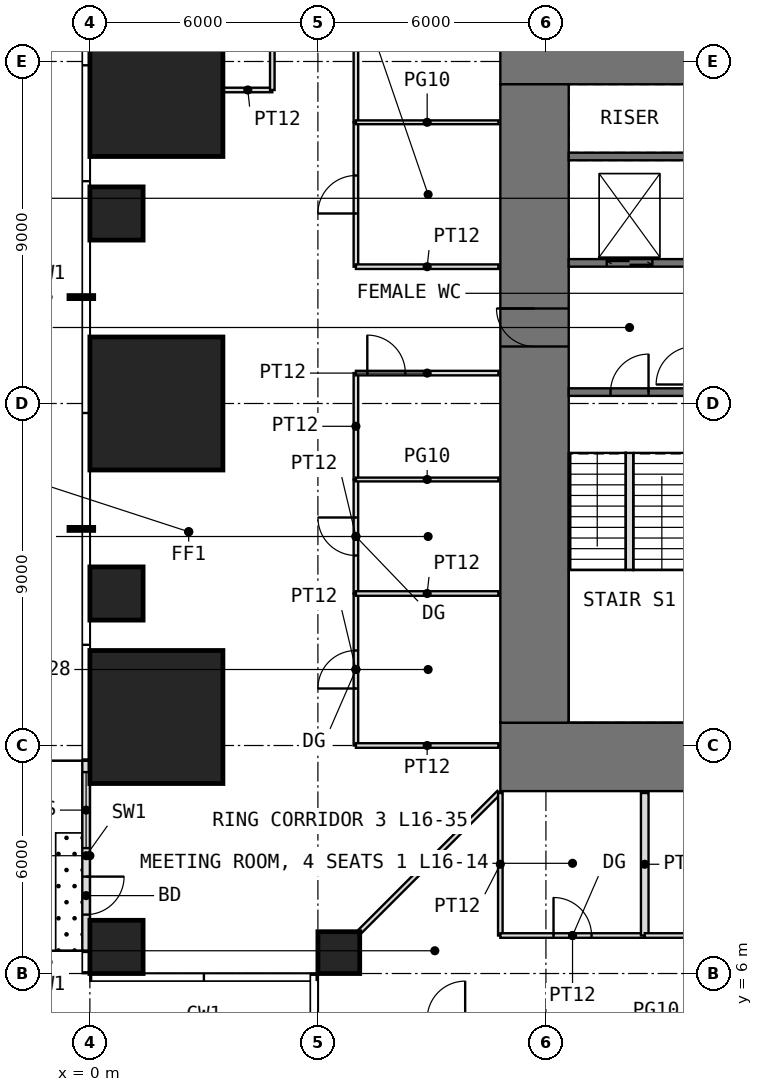
"""IFC4 building model, lengths in metres.
Left out: names, types, materials, properties, quantities, classifications, styles, units other than length and angle.
Written with IfcOpenShell. Run it as: python <this file> out.ifc"""

import sys

from ifc_helpers import new_model, si_unit, direction, frame, frame_2d, origin, origin_2d, place, context, subcontext, project, spatial, rectangle, extrude, element, fill, save


model = new_model("IFC4")
c1 = context("Model", 3, precision=1e-05, world=origin(), true_north=direction((0.0, 1.0)))
c2 = subcontext(c1, "Body", "Model", "MODEL_VIEW")
j1 = project(units=[si_unit("LENGTHUNIT", "METRE"), si_unit("PLANEANGLEUNIT", "RADIAN")], contexts=[c1])
p1 = place(None, origin())
s1 = spatial("IfcSite", under=j1, at=p1, CompositionType="ELEMENT")
p2 = place(p1, origin())
s2 = spatial("IfcBuilding", under=s1, at=p2, CompositionType="ELEMENT")
p3 = place(p2, frame((0.0, 0.0, 70.5)))
s3 = spatial("IfcBuildingStorey", under=s2, at=p3, CompositionType="ELEMENT", Elevation=70.5)
p4 = place(p3, frame((0.7, 6.7, 0.0), z_axis=(0.0, 0.0, 1.0), x_axis=(1.0, 0.0, 0.0)))
e1 = element("IfcColumn", 1, at=p4, inside=s3, PredefinedType="COLUMN", context=c2, shape_type="SweptSolid", body=[
    extrude(rectangle(XDim=1.4, YDim=1.4, at=origin_2d()), origin(), (0.0, 0.0, 1.0), 4.0),
])
p5 = place(p3, frame((6.55, 6.55, 0.0), z_axis=(0.0, 0.0, 1.0), x_axis=(1.0, 0.0, 0.0)))
e2 = element("IfcColumn", 2, at=p5, inside=s3, PredefinedType="COLUMN", context=c2, shape_type="SweptSolid", body=[
    extrude(rectangle(XDim=1.1, YDim=1.1, at=origin_2d()), origin(), (0.0, 0.0, 1.0), 4.0),
])
p6 = place(p3, frame((1.75, 12.75, 0.0), z_axis=(0.0, 0.0, 1.0), x_axis=(1.0, 0.0, 0.0)))
e3 = element("IfcColumn", 3, at=p6, inside=s3, PredefinedType="COLUMN", context=c2, shape_type="SweptSolid", body=[
    extrude(rectangle(XDim=3.5, YDim=3.5, at=origin_2d()), origin(), (0.0, 0.0, 1.0), 4.0),
])
p7 = place(p3, frame((0.7, 16.0, 0.0), z_axis=(0.0, 0.0, 1.0), x_axis=(1.0, 0.0, 0.0)))
e4 = element("IfcColumn", 4, at=p7, inside=s3, PredefinedType="COLUMN", context=c2, shape_type="SweptSolid", body=[
    extrude(rectangle(XDim=1.4, YDim=1.4, at=origin_2d()), origin(), (0.0, 0.0, 1.0), 4.0),
])
p8 = place(p3, frame((1.75, 21.0, 0.0), z_axis=(0.0, 0.0, 1.0), x_axis=(1.0, 0.0, 0.0)))
e5 = element("IfcColumn", 5, at=p8, inside=s3, PredefinedType="COLUMN", context=c2, shape_type="SweptSolid", body=[
    extrude(rectangle(XDim=3.5, YDim=3.5, at=origin_2d()), origin(), (0.0, 0.0, 1.0), 4.0),
])
p9 = place(p3, frame((0.7, 26.0, 0.0), z_axis=(0.0, 0.0, 1.0), x_axis=(1.0, 0.0, 0.0)))
e6 = element("IfcColumn", 6, at=p9, inside=s3, PredefinedType="COLUMN", context=c2, shape_type="SweptSolid", body=[
    extrude(rectangle(XDim=1.4, YDim=1.4, at=origin_2d()), origin(), (0.0, 0.0, 1.0), 4.0),
])
p10 = place(p3, frame((1.75, 29.25, 0.0), z_axis=(0.0, 0.0, 1.0), x_axis=(1.0, 0.0, 0.0)))
e7 = element("IfcColumn", 7, at=p10, inside=s3, PredefinedType="COLUMN", context=c2, shape_type="SweptSolid", body=[
    extrude(rectangle(XDim=3.5, YDim=3.5, at=origin_2d()), origin(), (0.0, 0.0, 1.0), 4.0),
])
p11 = place(p3, frame((-0.1, 11.6, 0.0), z_axis=(0.0, 0.0, 1.0), x_axis=(0.0, -1.0, 0.0)))
e8 = element("IfcWall", 8, at=p11, inside=s3, PredefinedType="USERDEFINED", context=c2, shape_type="SweptSolid", body=[
    extrude(rectangle(XDim=5.0, YDim=0.2, at=frame_2d((2.5, 0.0))), origin(), (0.0, 0.0, 1.0), 3.75),
])
p12 = place(p11, frame((3.05, 0.0, 0.0)))
e9 = element("IfcOpeningElement", 9, at=p12, cuts=e8, PredefinedType="OPENING", context=c2, shape_type="SweptSolid", body=[
    extrude(rectangle(XDim=1.0, YDim=2.4, at=frame_2d((0.5, 1.2))), frame((0.0, 0.11, 0.0), z_axis=(0.0, -1.0, 0.0), x_axis=(1.0, 0.0, 0.0)), (0.0, 0.0, 1.0), 0.22),
])
p13 = place(p11, frame((0.3, 0.0, 0.3)))
e10 = element("IfcOpeningElement", 10, at=p13, cuts=e8, PredefinedType="OPENING", context=c2, shape_type="SweptSolid", body=[
    extrude(rectangle(XDim=2.0, YDim=2.7, at=frame_2d((1.0, 1.35))), frame((0.0, 0.11, 0.0), z_axis=(0.0, -1.0, 0.0), x_axis=(1.0, 0.0, 0.0)), (0.0, 0.0, 1.0), 0.22),
])
p14 = place(p3, frame((10.8, 11.7, -0.05), z_axis=(0.0, 0.0, 1.0), x_axis=(1.0, 0.0, 0.0)))
e11 = element("IfcWall", 11, at=p14, inside=s3, PredefinedType="SHEAR", context=c2, shape_type="SweptSolid", body=[
    extrude(rectangle(XDim=20.4, YDim=1.8, at=frame_2d((10.2, 0.0))), origin(), (0.0, 0.0, 1.0), 4.0),
])
p15 = place(p14, frame((9.2, 0.0, 0.05)))
e12 = element("IfcOpeningElement", 12, at=p15, cuts=e11, PredefinedType="OPENING", context=c2, shape_type="SweptSolid", body=[
    extrude(rectangle(XDim=2.0, YDim=2.2, at=frame_2d((1.0, 1.1))), frame((0.0, 0.91, 0.0), z_axis=(0.0, -1.0, 0.0), x_axis=(1.0, 0.0, 0.0)), (0.0, 0.0, 1.0), 1.82),
])
p16 = place(p3, frame((10.8, 30.3, -0.05), z_axis=(0.0, 0.0, 1.0), x_axis=(1.0, 0.0, 0.0)))
e13 = element("IfcWall", 13, at=p16, inside=s3, PredefinedType="SHEAR", context=c2, shape_type="SweptSolid", body=[
    extrude(rectangle(XDim=20.4, YDim=1.8, at=frame_2d((10.2, 0.0))), origin(), (0.0, 0.0, 1.0), 4.0),
])
p17 = place(p16, frame((9.2, 0.0, 0.05)))
e14 = element("IfcOpeningElement", 14, at=p17, cuts=e13, PredefinedType="OPENING", context=c2, shape_type="SweptSolid", body=[
    extrude(rectangle(XDim=2.0, YDim=2.2, at=frame_2d((1.0, 1.1))), frame((0.0, 0.91, 0.0), z_axis=(0.0, -1.0, 0.0), x_axis=(1.0, 0.0, 0.0)), (0.0, 0.0, 1.0), 1.82),
])
p18 = place(p3, frame((11.7, 12.6, -0.05), z_axis=(0.0, 0.0, 1.0), x_axis=(0.0, 1.0, 0.0)))
e15 = element("IfcWall", 15, at=p18, inside=s3, PredefinedType="SHEAR", context=c2, shape_type="SweptSolid", body=[
    extrude(rectangle(XDim=16.8, YDim=1.8, at=frame_2d((8.4, 0.0))), origin(), (0.0, 0.0, 1.0), 4.0),
])
p19 = place(p18, frame((9.9, 0.0, 0.05)))
e16 = element("IfcOpeningElement", 16, at=p19, cuts=e15, PredefinedType="OPENING", context=c2, shape_type="SweptSolid", body=[
    extrude(rectangle(XDim=1.0, YDim=2.2, at=frame_2d((0.5, 1.1))), frame((0.0, 0.91, 0.0), z_axis=(0.0, -1.0, 0.0), x_axis=(1.0, 0.0, 0.0)), (0.0, 0.0, 1.0), 1.82),
])
p20 = place(p3, frame((12.6, 21.3, -0.05), z_axis=(0.0, 0.0, 1.0), x_axis=(1.0, 0.0, 0.0)))
e17 = element("IfcWall", 17, at=p20, inside=s3, PredefinedType="SHEAR", context=c2, shape_type="SweptSolid", body=[
    extrude(rectangle(XDim=3.2, YDim=0.2, at=frame_2d((1.6, 0.0))), origin(), (0.0, 0.0, 1.0), 4.0),
])
p21 = place(p20, frame((1.1, 0.0, 0.05)))
e18 = element("IfcOpeningElement", 18, at=p21, cuts=e17, PredefinedType="OPENING", context=c2, shape_type="SweptSolid", body=[
    extrude(rectangle(XDim=1.0, YDim=2.2, at=frame_2d((0.5, 1.1))), frame((0.0, 0.11, 0.0), z_axis=(0.0, -1.0, 0.0), x_axis=(1.0, 0.0, 0.0)), (0.0, 0.0, 1.0), 0.22),
])
p22 = place(p3, frame((12.6, 24.7, -0.05), z_axis=(0.0, 0.0, 1.0), x_axis=(1.0, 0.0, 0.0)))
e19 = element("IfcWall", 19, at=p22, inside=s3, PredefinedType="SHEAR", context=c2, shape_type="SweptSolid", body=[
    extrude(rectangle(XDim=3.2, YDim=0.2, at=frame_2d((1.6, 0.0))), origin(), (0.0, 0.0, 1.0), 4.0),
])
p23 = place(p22, frame((1.0, 0.0, 0.05)))
e20 = element("IfcOpeningElement", 20, at=p23, cuts=e19, PredefinedType="OPENING", context=c2, shape_type="SweptSolid", body=[
    extrude(rectangle(XDim=1.2, YDim=2.2, at=frame_2d((0.6, 1.1))), frame((0.0, 0.11, 0.0), z_axis=(0.0, -1.0, 0.0), x_axis=(1.0, 0.0, 0.0)), (0.0, 0.0, 1.0), 0.22),
])
p24 = place(p3, frame((12.6, 27.5, -0.05), z_axis=(0.0, 0.0, 1.0), x_axis=(1.0, 0.0, 0.0)))
e21 = element("IfcWall", 21, at=p24, inside=s3, PredefinedType="SHEAR", context=c2, shape_type="SweptSolid", body=[
    extrude(rectangle(XDim=3.2, YDim=0.2, at=frame_2d((1.6, 0.0))), origin(), (0.0, 0.0, 1.0), 4.0),
])
p25 = place(p3, frame((3.51, 29.25, 0.0), z_axis=(0.0, 0.0, 1.0), x_axis=(1.0, 0.0, 0.0)))
e22 = element("IfcWall", 22, at=p25, inside=s3, PredefinedType="PARTITIONING", context=c2, shape_type="SweptSolid", body=[
    extrude(rectangle(XDim=1.29, YDim=0.12, at=frame_2d((0.645, 0.0))), origin(), (0.0, 0.0, 1.0), 3.75),
])
p26 = place(p3, frame((4.8, 29.25, 0.0), z_axis=(0.0, 0.0, 1.0), x_axis=(0.0, 1.0, 0.0)))
e23 = element("IfcWall", 23, at=p26, inside=s3, PredefinedType="PARTITIONING", context=c2, shape_type="SweptSolid", body=[
    extrude(rectangle(XDim=6.75, YDim=0.12, at=frame_2d((3.375, 0.0))), origin(), (0.0, 0.0, 1.0), 3.75),
])
p27 = place(p26, frame((2.875, 0.0, 0.0)))
e24 = element("IfcOpeningElement", 24, at=p27, cuts=e23, PredefinedType="OPENING", context=c2, shape_type="SweptSolid", body=[
    extrude(rectangle(XDim=1.0, YDim=2.2, at=frame_2d((0.5, 1.1))), frame((0.0, 0.07, 0.0), z_axis=(0.0, -1.0, 0.0), x_axis=(1.0, 0.0, 0.0)), (0.0, 0.0, 1.0), 0.14),
])
p28 = place(p3, frame((7.0, 12.0, 0.0), z_axis=(0.0, 0.0, 1.0), x_axis=(0.0, 1.0, 0.0)))
e25 = element("IfcWall", 25, at=p28, inside=s3, PredefinedType="PARTITIONING", context=c2, shape_type="SweptSolid", body=[
    extrude(rectangle(XDim=4.0, YDim=0.12, at=frame_2d((2.0, 0.0))), origin(), (0.0, 0.0, 1.0), 3.75),
])
p29 = place(p28, frame((1.5, 0.0, 0.0)))
e26 = element("IfcOpeningElement", 26, at=p29, cuts=e25, PredefinedType="OPENING", context=c2, shape_type="SweptSolid", body=[
    extrude(rectangle(XDim=1.0, YDim=2.4, at=frame_2d((0.5, 1.2))), frame((0.0, 0.07, 0.0), z_axis=(0.0, -1.0, 0.0), x_axis=(1.0, 0.0, 0.0)), (0.0, 0.0, 1.0), 0.14),
])
p30 = place(p3, frame((7.0, 12.0, 0.0), z_axis=(0.0, 0.0, 1.0), x_axis=(1.0, 0.0, 0.0)))
e27 = element("IfcWall", 27, at=p30, inside=s3, PredefinedType="PARTITIONING", context=c2, shape_type="SweptSolid", body=[
    extrude(rectangle(XDim=3.75, YDim=0.12, at=frame_2d((1.875, 0.0))), origin(), (0.0, 0.0, 1.0), 3.75),
])
p31 = place(p3, frame((7.0, 16.0, 0.0), z_axis=(0.0, 0.0, 1.0), x_axis=(0.0, 1.0, 0.0)))
e28 = element("IfcWall", 28, at=p31, inside=s3, PredefinedType="PARTITIONING", context=c2, shape_type="SweptSolid", body=[
    extrude(rectangle(XDim=3.0, YDim=0.12, at=frame_2d((1.5, 0.0))), origin(), (0.0, 0.0, 1.0), 3.75),
])
p32 = place(p31, frame((1.0, 0.0, 0.0)))
e29 = element("IfcOpeningElement", 29, at=p32, cuts=e28, PredefinedType="OPENING", context=c2, shape_type="SweptSolid", body=[
    extrude(rectangle(XDim=1.0, YDim=2.4, at=frame_2d((0.5, 1.2))), frame((0.0, 0.07, 0.0), z_axis=(0.0, -1.0, 0.0), x_axis=(1.0, 0.0, 0.0)), (0.0, 0.0, 1.0), 0.14),
])
p33 = place(p3, frame((7.0, 16.0, 0.0), z_axis=(0.0, 0.0, 1.0), x_axis=(1.0, 0.0, 0.0)))
e30 = element("IfcWall", 30, at=p33, inside=s3, PredefinedType="PARTITIONING", context=c2, shape_type="SweptSolid", body=[
    extrude(rectangle(XDim=3.75, YDim=0.12, at=frame_2d((1.875, 0.0))), origin(), (0.0, 0.0, 1.0), 3.75),
])
p34 = place(p3, frame((7.0, 19.0, 0.0), z_axis=(0.0, 0.0, 1.0), x_axis=(0.0, 1.0, 0.0)))
e31 = element("IfcWall", 31, at=p34, inside=s3, PredefinedType="PARTITIONING", context=c2, shape_type="SweptSolid", body=[
    extrude(rectangle(XDim=2.8, YDim=0.12, at=frame_2d((1.4, 0.0))), origin(), (0.0, 0.0, 1.0), 3.75),
])
p35 = place(p3, frame((7.0, 19.0, 0.0), z_axis=(0.0, 0.0, 1.0), x_axis=(1.0, 0.0, 0.0)))
e32 = element("IfcWall", 32, at=p35, inside=s3, PredefinedType="PARTITIONING", context=c2, shape_type="SweptSolid", body=[
    extrude(rectangle(XDim=3.75, YDim=0.1, at=frame_2d((1.875, 0.0))), origin(), (0.0, 0.0, 1.0), 3.75),
])
p36 = place(p3, frame((7.0, 21.8, 0.0), z_axis=(0.0, 0.0, 1.0), x_axis=(1.0, 0.0, 0.0)))
e33 = element("IfcWall", 33, at=p36, inside=s3, PredefinedType="PARTITIONING", context=c2, shape_type="SweptSolid", body=[
    extrude(rectangle(XDim=3.75, YDim=0.12, at=frame_2d((1.875, 0.0))), origin(), (0.0, 0.0, 1.0), 3.75),
])
p37 = place(p36, frame((0.3, 0.0, 0.0)))
e34 = element("IfcOpeningElement", 34, at=p37, cuts=e33, PredefinedType="OPENING", context=c2, shape_type="SweptSolid", body=[
    extrude(rectangle(XDim=1.0, YDim=2.4, at=frame_2d((0.5, 1.2))), frame((0.0, 0.07, 0.0), z_axis=(0.0, -1.0, 0.0), x_axis=(1.0, 0.0, 0.0)), (0.0, 0.0, 1.0), 0.14),
])
p38 = place(p3, frame((7.0, 24.6, 0.0), z_axis=(0.0, 0.0, 1.0), x_axis=(0.0, 1.0, 0.0)))
e35 = element("IfcWall", 35, at=p38, inside=s3, PredefinedType="PARTITIONING", context=c2, shape_type="SweptSolid", body=[
    extrude(rectangle(XDim=3.8, YDim=0.12, at=frame_2d((1.9, 0.0))), origin(), (0.0, 0.0, 1.0), 3.75),
])
p39 = place(p38, frame((1.4, 0.0, 0.0)))
e36 = element("IfcOpeningElement", 36, at=p39, cuts=e35, PredefinedType="OPENING", context=c2, shape_type="SweptSolid", body=[
    extrude(rectangle(XDim=1.0, YDim=2.4, at=frame_2d((0.5, 1.2))), frame((0.0, 0.07, 0.0), z_axis=(0.0, -1.0, 0.0), x_axis=(1.0, 0.0, 0.0)), (0.0, 0.0, 1.0), 0.14),
])
p40 = place(p3, frame((7.0, 24.6, 0.0), z_axis=(0.0, 0.0, 1.0), x_axis=(1.0, 0.0, 0.0)))
e37 = element("IfcWall", 37, at=p40, inside=s3, PredefinedType="PARTITIONING", context=c2, shape_type="SweptSolid", body=[
    extrude(rectangle(XDim=3.75, YDim=0.12, at=frame_2d((1.875, 0.0))), origin(), (0.0, 0.0, 1.0), 3.75),
])
p41 = place(p3, frame((7.0, 28.4, 0.0), z_axis=(0.0, 0.0, 1.0), x_axis=(0.0, 1.0, 0.0)))
e38 = element("IfcWall", 38, at=p41, inside=s3, PredefinedType="PARTITIONING", context=c2, shape_type="SweptSolid", body=[
    extrude(rectangle(XDim=2.8, YDim=0.12, at=frame_2d((1.4, 0.0))), origin(), (0.0, 0.0, 1.0), 3.75),
])
p42 = place(p3, frame((7.0, 28.4, 0.0), z_axis=(0.0, 0.0, 1.0), x_axis=(1.0, 0.0, 0.0)))
e39 = element("IfcWall", 39, at=p42, inside=s3, PredefinedType="PARTITIONING", context=c2, shape_type="SweptSolid", body=[
    extrude(rectangle(XDim=3.75, YDim=0.1, at=frame_2d((1.875, 0.0))), origin(), (0.0, 0.0, 1.0), 3.75),
])
p43 = place(p3, frame((7.11, 7.11, 0.0), z_axis=(0.0, 0.0, 1.0), x_axis=(0.707106781187, 0.707106781187, 0.0)))
e40 = element("IfcWall", 40, at=p43, inside=s3, PredefinedType="PARTITIONING", context=c2, shape_type="SweptSolid", body=[
    extrude(rectangle(XDim=5.168, YDim=0.12, at=frame_2d((2.584, 0.0))), origin(), (0.0, 0.0, 1.0), 3.75),
])
p44 = place(p3, frame((10.8, 7.0, 0.0), z_axis=(0.0, 0.0, 1.0), x_axis=(0.0, 1.0, 0.0)))
e41 = element("IfcWall", 41, at=p44, inside=s3, PredefinedType="PARTITIONING", context=c2, shape_type="SweptSolid", body=[
    extrude(rectangle(XDim=3.75, YDim=0.12, at=frame_2d((1.875, 0.0))), origin(), (0.0, 0.0, 1.0), 3.75),
])
p45 = place(p3, frame((10.8, 7.0, 0.0), z_axis=(0.0, 0.0, 1.0), x_axis=(1.0, 0.0, 0.0)))
e42 = element("IfcWall", 42, at=p45, inside=s3, PredefinedType="PARTITIONING", context=c2, shape_type="SweptSolid", body=[
    extrude(rectangle(XDim=3.8, YDim=0.12, at=frame_2d((1.9, 0.0))), origin(), (0.0, 0.0, 1.0), 3.75),
])
p46 = place(p45, frame((1.4, 0.0, 0.0)))
e43 = element("IfcOpeningElement", 43, at=p46, cuts=e42, PredefinedType="OPENING", context=c2, shape_type="SweptSolid", body=[
    extrude(rectangle(XDim=1.0, YDim=2.4, at=frame_2d((0.5, 1.2))), frame((0.0, 0.07, 0.0), z_axis=(0.0, -1.0, 0.0), x_axis=(1.0, 0.0, 0.0)), (0.0, 0.0, 1.0), 0.14),
])
p47 = place(p3, frame((14.6, 7.0, 0.0), z_axis=(0.0, 0.0, 1.0), x_axis=(0.0, 1.0, 0.0)))
e44 = element("IfcWall", 44, at=p47, inside=s3, PredefinedType="PARTITIONING", context=c2, shape_type="SweptSolid", body=[
    extrude(rectangle(XDim=3.75, YDim=0.2, at=frame_2d((1.875, 0.0))), origin(), (0.0, 0.0, 1.0), 3.75),
])
p48 = place(p3, frame((14.6, 7.0, 0.0), z_axis=(0.0, 0.0, 1.0), x_axis=(1.0, 0.0, 0.0)))
e45 = element("IfcWall", 45, at=p48, inside=s3, PredefinedType="PARTITIONING", context=c2, shape_type="SweptSolid", body=[
    extrude(rectangle(XDim=3.8, YDim=0.12, at=frame_2d((1.9, 0.0))), origin(), (0.0, 0.0, 1.0), 3.75),
])
p49 = place(p48, frame((1.4, 0.0, 0.0)))
e46 = element("IfcOpeningElement", 46, at=p49, cuts=e45, PredefinedType="OPENING", context=c2, shape_type="SweptSolid", body=[
    extrude(rectangle(XDim=1.0, YDim=2.4, at=frame_2d((0.5, 1.2))), frame((0.0, 0.07, 0.0), z_axis=(0.0, -1.0, 0.0), x_axis=(1.0, 0.0, 0.0)), (0.0, 0.0, 1.0), 0.14),
])
p50 = place(p3, frame((14.2, 16.62, 0.0), z_axis=(0.0, 0.0, 1.0), x_axis=(0.0, 1.0, 0.0)))
e47 = element("IfcWall", 47, at=p50, inside=s3, PredefinedType="PARTITIONING", context=c2, shape_type="SweptSolid", body=[
    extrude(rectangle(XDim=3.08, YDim=0.2, at=frame_2d((1.54, 0.0))), origin(), (0.0, 0.0, 1.0), 4.0),
])
p51 = place(p12, origin())
e48 = element("IfcDoor", 48, at=p51, inside=s3, OperationType="SINGLE_SWING_LEFT", PredefinedType="DOOR", context=c2, shape_type="SweptSolid", body=[
    extrude(rectangle(XDim=1.0, YDim=2.4, at=frame_2d((0.5, 1.2))), frame((0.0, 0.025, 0.0), z_axis=(0.0, -1.0, 0.0), x_axis=(1.0, 0.0, 0.0)), (0.0, 0.0, 1.0), 0.05),
])
fill(e9, e48)
p52 = place(p13, origin())
e49 = element("IfcWindow", 49, at=p52, inside=s3, PartitioningType="SINGLE_PANEL", PredefinedType="WINDOW", context=c2, shape_type="SweptSolid", body=[
    extrude(rectangle(XDim=2.0, YDim=2.7, at=frame_2d((1.0, 1.35))), frame((0.0, 0.03, 0.0), z_axis=(0.0, -1.0, 0.0), x_axis=(1.0, 0.0, 0.0)), (0.0, 0.0, 1.0), 0.06),
])
fill(e10, e49)
p53 = place(p19, origin())
e50 = element("IfcDoor", 50, at=p53, inside=s3, OperationType="SINGLE_SWING_RIGHT", PredefinedType="DOOR", context=c2, shape_type="SweptSolid", body=[
    extrude(rectangle(XDim=1.0, YDim=2.2, at=frame_2d((0.5, 1.1))), frame((0.0, 0.025, 0.0), z_axis=(0.0, -1.0, 0.0), x_axis=(1.0, 0.0, 0.0)), (0.0, 0.0, 1.0), 0.05),
])
fill(e16, e50)
p54 = place(p21, origin())
e51 = element("IfcDoor", 51, at=p54, inside=s3, OperationType="SINGLE_SWING_RIGHT", PredefinedType="DOOR", context=c2, shape_type="SweptSolid", body=[
    extrude(rectangle(XDim=1.0, YDim=2.2, at=frame_2d((0.5, 1.1))), frame((0.0, 0.025, 0.0), z_axis=(0.0, -1.0, 0.0), x_axis=(1.0, 0.0, 0.0)), (0.0, 0.0, 1.0), 0.05),
])
fill(e18, e51)
p55 = place(p46, origin())
e52 = element("IfcDoor", 52, at=p55, inside=s3, OperationType="SINGLE_SWING_LEFT", PredefinedType="DOOR", context=c2, shape_type="SweptSolid", body=[
    extrude(rectangle(XDim=1.0, YDim=2.4, at=frame_2d((0.5, 1.2))), frame((0.0, 0.025, 0.0), z_axis=(0.0, -1.0, 0.0), x_axis=(1.0, 0.0, 0.0)), (0.0, 0.0, 1.0), 0.05),
])
fill(e43, e52)
p56 = place(p29, origin())
e53 = element("IfcDoor", 53, at=p56, inside=s3, OperationType="SINGLE_SWING_LEFT", PredefinedType="DOOR", context=c2, shape_type="SweptSolid", body=[
    extrude(rectangle(XDim=1.0, YDim=2.4, at=frame_2d((0.5, 1.2))), frame((0.0, 0.025, 0.0), z_axis=(0.0, -1.0, 0.0), x_axis=(1.0, 0.0, 0.0)), (0.0, 0.0, 1.0), 0.05),
])
fill(e26, e53)
p57 = place(p32, origin())
e54 = element("IfcDoor", 54, at=p57, inside=s3, OperationType="SINGLE_SWING_RIGHT", PredefinedType="DOOR", context=c2, shape_type="SweptSolid", body=[
    extrude(rectangle(XDim=1.0, YDim=2.4, at=frame_2d((0.5, 1.2))), frame((0.0, 0.025, 0.0), z_axis=(0.0, -1.0, 0.0), x_axis=(1.0, 0.0, 0.0)), (0.0, 0.0, 1.0), 0.05),
])
fill(e29, e54)
p58 = place(p39, origin())
e55 = element("IfcDoor", 55, at=p58, inside=s3, OperationType="SINGLE_SWING_LEFT", PredefinedType="DOOR", context=c2, shape_type="SweptSolid", body=[
    extrude(rectangle(XDim=1.0, YDim=2.4, at=frame_2d((0.5, 1.2))), frame((0.0, 0.025, 0.0), z_axis=(0.0, -1.0, 0.0), x_axis=(1.0, 0.0, 0.0)), (0.0, 0.0, 1.0), 0.05),
])
fill(e36, e55)
p59 = place(p37, origin())
e56 = element("IfcDoor", 56, at=p59, inside=s3, OperationType="SINGLE_SWING_LEFT", PredefinedType="DOOR", context=c2, shape_type="SweptSolid", body=[
    extrude(rectangle(XDim=1.0, YDim=2.4, at=frame_2d((0.5, 1.2))), frame((0.0, 0.025, 0.0), z_axis=(0.0, -1.0, 0.0), x_axis=(1.0, 0.0, 0.0)), (0.0, 0.0, 1.0), 0.05),
])
fill(e34, e56)
p60 = place(p23, origin())
e57 = element("IfcDoor", 57, at=p60, inside=s3, OperationType="DOUBLE_DOOR_SLIDING", PredefinedType="DOOR", context=c2, shape_type="SweptSolid", body=[
    extrude(rectangle(XDim=1.2, YDim=2.2, at=frame_2d((0.6, 1.1))), frame((0.0, 0.025, 0.0), z_axis=(0.0, -1.0, 0.0), x_axis=(1.0, 0.0, 0.0)), (0.0, 0.0, 1.0), 0.05),
])
fill(e20, e57)
save(model, sys.argv[1])
